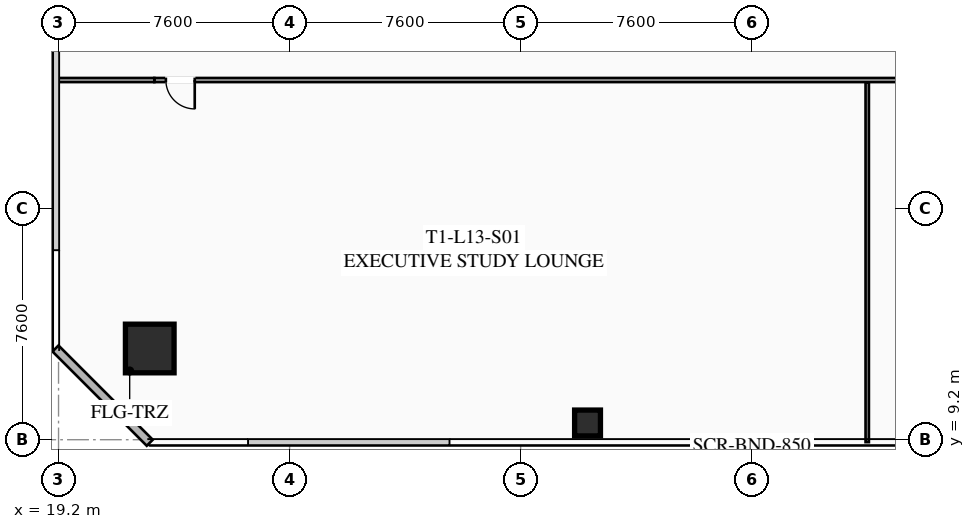
"""IFC4 building model, lengths in metres.
Left out: names, types, materials, properties, quantities, classifications, styles, units other than length and angle.
Written with IfcOpenShell. Run it as: python <this file> out.ifc"""

import sys

from ifc_helpers import new_model, si_unit, direction, frame, frame_2d, origin, origin_2d, place, context, subcontext, project, spatial, rectangle, hollow_rectangle, extrude, element, fill, save


model = new_model("IFC4")
c1 = context("Model", 3, precision=1e-05, world=origin(), true_north=direction((0.0, 1.0)))
c2 = subcontext(c1, "Body", "Model", "MODEL_VIEW")
j1 = project(units=[si_unit("LENGTHUNIT", "METRE"), si_unit("PLANEANGLEUNIT", "RADIAN")], contexts=[c1])
p1 = place(None, origin())
s1 = spatial("IfcSite", under=j1, at=p1, CompositionType="ELEMENT")
p2 = place(p1, origin())
s2 = spatial("IfcBuilding", under=s1, at=p2, CompositionType="ELEMENT")
p3 = place(p2, frame((0.0, 0.0, 53.0)))
s3 = spatial("IfcBuildingStorey", under=s2, at=p3, CompositionType="ELEMENT", Elevation=53.0)
p4 = place(p3, frame((22.2, 12.2, 0.0), z_axis=(0.0, 0.0, 1.0), x_axis=(1.0, 0.0, 0.0)))
e1 = element("IfcColumn", 1, at=p4, inside=s3, PredefinedType="COLUMN", context=c2, shape_type="SweptSolid", body=[
    extrude(hollow_rectangle(XDim=1.6, YDim=1.6, WallThickness=0.06, at=origin_2d()), origin(), (0.0, 0.0, 1.0), 3.35),
])
p5 = place(p3, frame((36.6, 9.75, 0.0), z_axis=(0.0, 0.0, 1.0), x_axis=(1.0, 0.0, 0.0)))
e2 = element("IfcColumn", 2, at=p5, inside=s3, PredefinedType="COLUMN", context=c2, shape_type="SweptSolid", body=[
    extrude(hollow_rectangle(XDim=0.85, YDim=0.85, WallThickness=0.035, at=origin_2d()), origin(), (0.0, 0.0, 1.0), 3.35),
])
p6 = place(p3, frame((22.2, 9.1, 0.0), z_axis=(0.0, 0.0, 1.0), x_axis=(-0.707106781187, 0.707106781187, 0.0)))
e3 = element("IfcWall", 3, at=p6, inside=s3, PredefinedType="SOLIDWALL", context=c2, shape_type="SweptSolid", body=[
    extrude(rectangle(XDim=4.384, YDim=0.28, at=frame_2d((2.192, 0.0))), origin(), (0.0, 0.0, 1.0), 3.35),
])
p7 = place(p3, frame((51.35, 21.03, 0.0), z_axis=(0.0, 0.0, 1.0), x_axis=(-1.0, 0.0, 0.0)))
e4 = element("IfcWall", 4, at=p7, inside=s3, PredefinedType="PARTITIONING", context=c2, shape_type="SweptSolid", body=[
    extrude(rectangle(XDim=29.0, YDim=0.135, at=frame_2d((14.5, 0.0))), origin(), (0.0, 0.0, 1.0), 2.703),
])
p8 = place(p7, frame((27.67, 0.0, 0.0)))
e5 = element("IfcOpeningElement", 5, at=p8, cuts=e4, PredefinedType="OPENING", context=c2, shape_type="SweptSolid", body=[
    extrude(rectangle(XDim=0.95, YDim=2.05, at=frame_2d((0.475, 1.025))), frame((0.0, 0.077, 0.0), z_axis=(0.0, -1.0, 0.0), x_axis=(1.0, 0.0, 0.0)), (0.0, 0.0, 1.0), 0.155),
])
p9 = place(p7, frame((0.38, 0.0, 0.0)))
e6 = element("IfcOpeningElement", 6, at=p9, cuts=e4, PredefinedType="OPENING", context=c2, shape_type="SweptSolid", body=[
    extrude(rectangle(XDim=0.95, YDim=2.05, at=frame_2d((0.475, 1.025))), frame((0.0, 0.077, 0.0), z_axis=(0.0, -1.0, 0.0), x_axis=(1.0, 0.0, 0.0)), (0.0, 0.0, 1.0), 0.155),
])
p10 = place(p3, frame((19.12, 21.03, 0.0), z_axis=(0.0, 0.0, 1.0), x_axis=(1.0, 0.0, 0.0)))
e7 = element("IfcWall", 7, at=p10, inside=s3, PredefinedType="PARTITIONING", context=c2, shape_type="SweptSolid", body=[
    extrude(rectangle(XDim=3.23, YDim=0.135, at=frame_2d((1.615, 0.0))), origin(), (0.0, 0.0, 1.0), 2.703),
])
p11 = place(p3, frame((45.8, 9.12, 0.0), z_axis=(0.0, 0.0, 1.0), x_axis=(0.0, 1.0, 0.0)))
e8 = element("IfcWall", 8, at=p11, inside=s3, PredefinedType="PARTITIONING", context=c2, shape_type="SweptSolid", body=[
    extrude(rectangle(XDim=11.83, YDim=0.11, at=frame_2d((5.915, 0.0))), origin(), (0.0, 0.0, 1.0), 2.703),
])
p12 = place(p8, origin())
e9 = element("IfcDoor", 9, at=p12, inside=s3, OperationType="SINGLE_SWING_LEFT", PredefinedType="DOOR", context=c2, shape_type="SweptSolid", body=[
    extrude(rectangle(XDim=0.95, YDim=2.05, at=frame_2d((0.475, 1.025))), frame((0.0, 0.025, 0.0), z_axis=(0.0, -1.0, 0.0), x_axis=(1.0, 0.0, 0.0)), (0.0, 0.0, 1.0), 0.05),
])
fill(e5, e9)
save(model, sys.argv[1])
